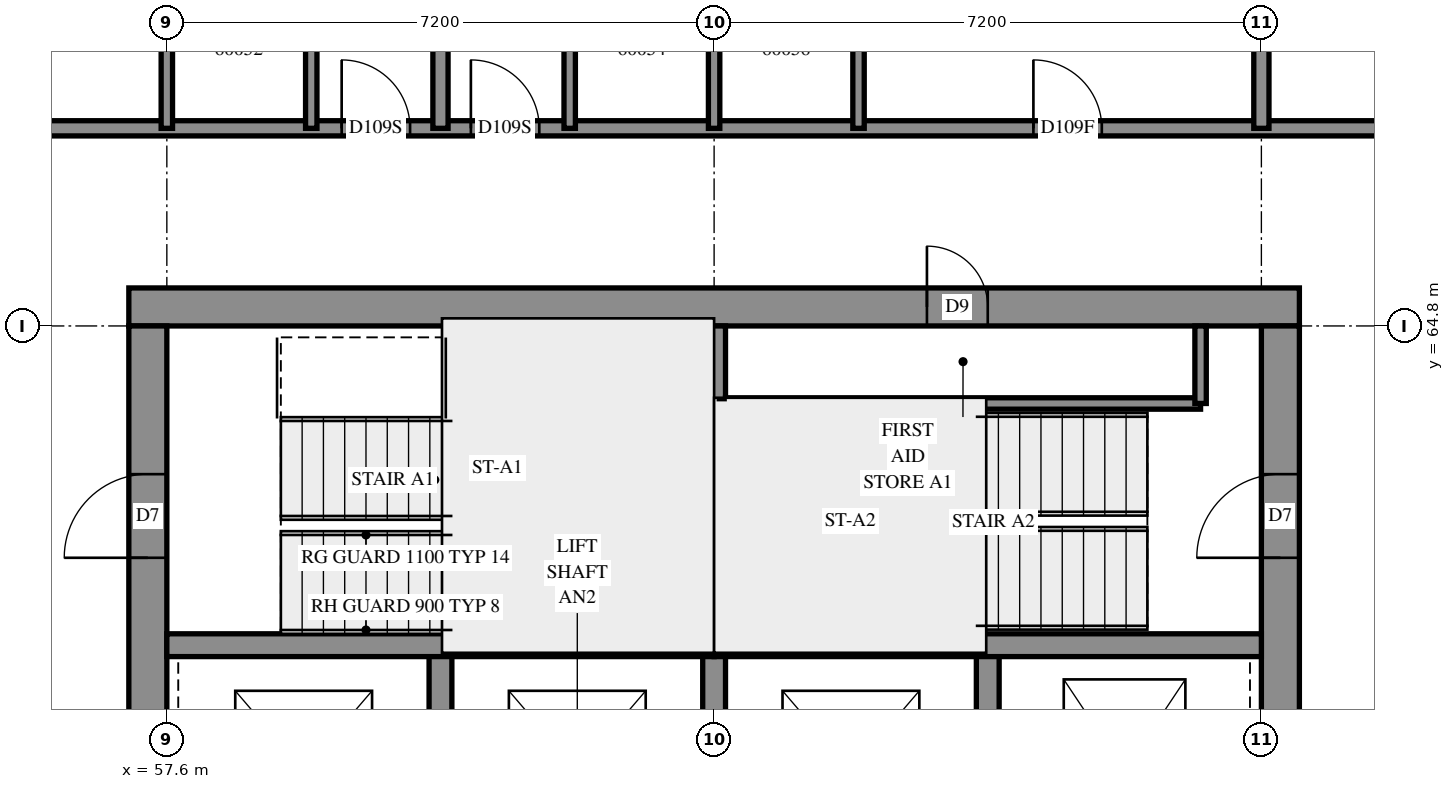
"""IFC4 building model, lengths in metres.
Left out: names, types, materials, properties, quantities, classifications, styles, units other than length and angle.
Written with IfcOpenShell. Run it as: python <this file> out.ifc"""

import sys

from ifc_helpers import new_model, si_unit, direction, frame, frame_2d, origin, place, context, subcontext, project, spatial, rectangle, extrude, element, fill, save


model = new_model("IFC4")
c1 = context("Model", 3, precision=1e-05, world=origin(), true_north=direction((0.0, 1.0)))
c2 = subcontext(c1, "Body", "Model", "MODEL_VIEW")
j1 = project(units=[si_unit("LENGTHUNIT", "METRE"), si_unit("PLANEANGLEUNIT", "RADIAN")], contexts=[c1])
p1 = place(None, origin())
s1 = spatial("IfcSite", under=j1, at=p1, CompositionType="ELEMENT")
p2 = place(p1, origin())
s2 = spatial("IfcBuilding", under=s1, at=p2, CompositionType="ELEMENT")
p3 = place(p2, frame((0.0, 0.0, 220.2)))
s3 = spatial("IfcBuildingStorey", under=s2, at=p3, CompositionType="ELEMENT", Elevation=220.2)
p4 = place(p3, frame((57.1, 65.05, -0.3), z_axis=(0.0, 0.0, 1.0), x_axis=(1.0, 0.0, 0.0)))
e1 = element("IfcWall", 1, at=p4, inside=s3, PredefinedType="SHEAR", context=c2, shape_type="SweptSolid", body=[
    extrude(rectangle(XDim=15.4, YDim=0.5, at=frame_2d((7.7, 0.0))), origin(), (0.0, 0.0, 1.0), 2.7),
])
p5 = place(p4, frame((10.5, 0.0, 0.3)))
e2 = element("IfcOpeningElement", 2, at=p5, cuts=e1, PredefinedType="OPENING", context=c2, shape_type="SweptSolid", body=[
    extrude(rectangle(XDim=0.8, YDim=2.1, at=frame_2d((0.4, 1.05))), frame((0.0, 0.26, 0.0), z_axis=(0.0, -1.0, 0.0), x_axis=(1.0, 0.0, 0.0)), (0.0, 0.0, 1.0), 0.52),
])
p6 = place(p3, frame((57.35, 50.4, -0.3), z_axis=(0.0, 0.0, 1.0), x_axis=(0.0, 1.0, 0.0)))
e3 = element("IfcWall", 3, at=p6, inside=s3, PredefinedType="SHEAR", context=c2, shape_type="SweptSolid", body=[
    extrude(rectangle(XDim=14.4, YDim=0.5, at=frame_2d((7.2, 0.0))), origin(), (0.0, 0.0, 1.0), 2.7),
])
p7 = place(p6, frame((4.55, 0.0, 0.3)))
e4 = element("IfcOpeningElement", 4, at=p7, cuts=e3, PredefinedType="OPENING", context=c2, shape_type="SweptSolid", body=[
    extrude(rectangle(XDim=1.1, YDim=2.1, at=frame_2d((0.55, 1.05))), frame((0.0, 0.26, 0.0), z_axis=(0.0, -1.0, 0.0), x_axis=(1.0, 0.0, 0.0)), (0.0, 0.0, 1.0), 0.52),
])
p8 = place(p6, frame((11.35, 0.0, 0.3)))
e5 = element("IfcOpeningElement", 5, at=p8, cuts=e3, PredefinedType="OPENING", context=c2, shape_type="SweptSolid", body=[
    extrude(rectangle(XDim=1.1, YDim=2.1, at=frame_2d((0.55, 1.05))), frame((0.0, 0.26, 0.0), z_axis=(0.0, -1.0, 0.0), x_axis=(1.0, 0.0, 0.0)), (0.0, 0.0, 1.0), 0.52),
])
p9 = place(p3, frame((72.25, 50.4, -0.3), z_axis=(0.0, 0.0, 1.0), x_axis=(0.0, 1.0, 0.0)))
e6 = element("IfcWall", 6, at=p9, inside=s3, PredefinedType="SHEAR", context=c2, shape_type="SweptSolid", body=[
    extrude(rectangle(XDim=14.4, YDim=0.5, at=frame_2d((7.2, 0.0))), origin(), (0.0, 0.0, 1.0), 2.7),
])
p10 = place(p9, frame((4.55, 0.0, 0.3)))
e7 = element("IfcOpeningElement", 7, at=p10, cuts=e6, PredefinedType="OPENING", context=c2, shape_type="SweptSolid", body=[
    extrude(rectangle(XDim=1.1, YDim=2.1, at=frame_2d((0.55, 1.05))), frame((0.0, 0.26, 0.0), z_axis=(0.0, -1.0, 0.0), x_axis=(1.0, 0.0, 0.0)), (0.0, 0.0, 1.0), 0.52),
])
p11 = place(p9, frame((11.35, 0.0, 0.3)))
e8 = element("IfcOpeningElement", 8, at=p11, cuts=e6, PredefinedType="OPENING", context=c2, shape_type="SweptSolid", body=[
    extrude(rectangle(XDim=1.1, YDim=2.1, at=frame_2d((0.55, 1.05))), frame((0.0, 0.26, 0.0), z_axis=(0.0, -1.0, 0.0), x_axis=(1.0, 0.0, 0.0)), (0.0, 0.0, 1.0), 0.52),
])
for number, where, z_axis, x_axis in (
    (9, (61.2, 57.3, 0.0), (0.0, 0.0, 1.0), (0.0, 1.0, 0.0)),
    (10, (64.8, 57.3, 0.0), (0.0, 0.0, 1.0), (0.0, 1.0, 0.0)),
    (11, (68.4, 57.3, 0.0), (0.0, 0.0, 1.0), (0.0, 1.0, 0.0)),
):
    element("IfcWall", number, at=place(p3, frame(where, z_axis=z_axis, x_axis=x_axis)), inside=s3, PredefinedType="SOLIDWALL", context=c2, shape_type="SweptSolid", body=[
        extrude(rectangle(XDim=3.3, YDim=0.3, at=frame_2d((1.65, 0.0))), origin(), (0.0, 0.0, 1.0), 3.1),
    ])
for number, where, z_axis, x_axis in (
    (12, (57.6, 60.6, 0.0), (0.0, 0.0, 1.0), (1.0, 0.0, 0.0)),
    (13, (64.8, 60.6, 0.0), (0.0, 0.0, 1.0), (1.0, 0.0, 0.0)),
):
    element("IfcWall", number, at=place(p3, frame(where, z_axis=z_axis, x_axis=x_axis)), inside=s3, PredefinedType="SOLIDWALL", context=c2, shape_type="SweptSolid", body=[
        extrude(rectangle(XDim=7.2, YDim=0.3, at=frame_2d((3.6, 0.0))), origin(), (0.0, 0.0, 1.0), 3.1),
    ])
p12 = place(p3, frame((64.8, 60.6, 0.0), z_axis=(0.0, 0.0, 1.0), x_axis=(0.0, 1.0, 0.0)))
e14 = element("IfcWall", 14, at=p12, inside=s3, PredefinedType="SOLIDWALL", context=c2, shape_type="SweptSolid", body=[
    extrude(rectangle(XDim=4.2, YDim=0.3, at=frame_2d((2.1, 0.0))), origin(), (0.0, 0.0, 1.0), 3.1),
])
p13 = place(p3, frame((64.95, 63.78, 0.0), z_axis=(0.0, 0.0, 1.0), x_axis=(1.0, 0.0, 0.0)))
e15 = element("IfcWall", 15, at=p13, inside=s3, PredefinedType="PARTITIONING", context=c2, shape_type="SweptSolid", body=[
    extrude(rectangle(XDim=6.25, YDim=0.15, at=frame_2d((3.125, 0.0))), origin(), (0.0, 0.0, 1.0), 3.1),
])
p14 = place(p3, frame((71.2, 63.78, 0.0), z_axis=(0.0, 0.0, 1.0), x_axis=(0.0, 1.0, 0.0)))
e16 = element("IfcWall", 16, at=p14, inside=s3, PredefinedType="PARTITIONING", context=c2, shape_type="SweptSolid", body=[
    extrude(rectangle(XDim=1.02, YDim=0.15, at=frame_2d((0.51, 0.0))), origin(), (0.0, 0.0, 1.0), 3.1),
])
p15 = place(p3, frame((55.0, 67.4, 0.0), z_axis=(0.0, 0.0, 1.0), x_axis=(1.0, 0.0, 0.0)))
e17 = element("IfcWall", 17, at=p15, inside=s3, PredefinedType="PARTITIONING", context=c2, shape_type="SweptSolid", body=[
    extrude(rectangle(XDim=19.6, YDim=0.2, at=frame_2d((9.8, 0.0))), origin(), (0.0, 0.0, 1.0), 3.1),
])
p16 = place(p15, frame((4.9, 0.0, 0.0)))
e18 = element("IfcOpeningElement", 18, at=p16, cuts=e17, PredefinedType="OPENING", context=c2, shape_type="SweptSolid", body=[
    extrude(rectangle(XDim=0.9, YDim=2.1, at=frame_2d((0.45, 1.05))), frame((0.0, 0.11, 0.0), z_axis=(0.0, -1.0, 0.0), x_axis=(1.0, 0.0, 0.0)), (0.0, 0.0, 1.0), 0.22),
])
p17 = place(p15, frame((6.6, 0.0, 0.0)))
e19 = element("IfcOpeningElement", 19, at=p17, cuts=e17, PredefinedType="OPENING", context=c2, shape_type="SweptSolid", body=[
    extrude(rectangle(XDim=0.9, YDim=2.1, at=frame_2d((0.45, 1.05))), frame((0.0, 0.11, 0.0), z_axis=(0.0, -1.0, 0.0), x_axis=(1.0, 0.0, 0.0)), (0.0, 0.0, 1.0), 0.22),
])
p18 = place(p15, frame((14.001, 0.0, 0.0)))
e20 = element("IfcOpeningElement", 20, at=p18, cuts=e17, PredefinedType="OPENING", context=c2, shape_type="SweptSolid", body=[
    extrude(rectangle(XDim=0.9, YDim=2.1, at=frame_2d((0.45, 1.05))), frame((0.0, 0.11, 0.0), z_axis=(0.0, -1.0, 0.0), x_axis=(1.0, 0.0, 0.0)), (0.0, 0.0, 1.0), 0.22),
])
p19 = place(p3, frame((61.2, 67.4, 0.0), z_axis=(0.0, 0.0, 1.0), x_axis=(0.0, 1.0, 0.0)))
e21 = element("IfcWall", 21, at=p19, inside=s3, PredefinedType="PARTITIONING", context=c2, shape_type="SweptSolid", body=[
    extrude(rectangle(XDim=5.327, YDim=0.2, at=frame_2d((2.663, 0.0))), origin(), (0.0, 0.0, 1.0), 3.1),
])
p20 = place(p3, frame((72.0, 67.4, 0.0), z_axis=(0.0, 0.0, 1.0), x_axis=(0.0, 1.0, 0.0)))
e22 = element("IfcWall", 22, at=p20, inside=s3, PredefinedType="PARTITIONING", context=c2, shape_type="SweptSolid", body=[
    extrude(rectangle(XDim=4.096, YDim=0.2, at=frame_2d((2.048, 0.0))), origin(), (0.0, 0.0, 1.0), 3.1),
])
for number, where, z_axis, x_axis in (
    (23, (59.5, 67.4, 0.0), (0.0, 0.0, 1.0), (0.0, 1.0, 0.0)),
    (24, (57.6, 67.4, 0.0), (0.0, 0.0, 1.0), (0.0, 1.0, 0.0)),
    (25, (62.9, 67.4, 0.0), (0.0, 0.0, 1.0), (0.0, 1.0, 0.0)),
    (26, (64.8, 67.4, 0.0), (0.0, 0.0, 1.0), (0.0, 1.0, 0.0)),
    (27, (66.7, 67.4, 0.0), (0.0, 0.0, 1.0), (0.0, 1.0, 0.0)),
):
    element("IfcWall", number, at=place(p3, frame(where, z_axis=z_axis, x_axis=x_axis)), inside=s3, PredefinedType="PARTITIONING", context=c2, shape_type="SweptSolid", body=[
        extrude(rectangle(XDim=2.4, YDim=0.15, at=frame_2d((1.2, 0.0))), origin(), (0.0, 0.0, 1.0), 3.1),
    ])
p21 = place(p5, origin())
e28 = element("IfcDoor", 28, at=p21, inside=s3, OperationType="SINGLE_SWING_RIGHT", PredefinedType="DOOR", context=c2, shape_type="SweptSolid", body=[
    extrude(rectangle(XDim=0.8, YDim=2.1, at=frame_2d((0.4, 1.05))), frame((0.0, 0.025, 0.0), z_axis=(0.0, -1.0, 0.0), x_axis=(1.0, 0.0, 0.0)), (0.0, 0.0, 1.0), 0.05),
])
fill(e2, e28)
p22 = place(p8, origin())
e29 = element("IfcDoor", 29, at=p22, inside=s3, OperationType="SINGLE_SWING_LEFT", PredefinedType="DOOR", context=c2, shape_type="SweptSolid", body=[
    extrude(rectangle(XDim=1.1, YDim=2.1, at=frame_2d((0.55, 1.05))), frame((0.0, 0.025, 0.0), z_axis=(0.0, -1.0, 0.0), x_axis=(1.0, 0.0, 0.0)), (0.0, 0.0, 1.0), 0.05),
])
fill(e5, e29)
p23 = place(p11, origin())
e30 = element("IfcDoor", 30, at=p23, inside=s3, OperationType="SINGLE_SWING_RIGHT", PredefinedType="DOOR", context=c2, shape_type="SweptSolid", body=[
    extrude(rectangle(XDim=1.1, YDim=2.1, at=frame_2d((0.55, 1.05))), frame((0.0, 0.025, 0.0), z_axis=(0.0, -1.0, 0.0), x_axis=(1.0, 0.0, 0.0)), (0.0, 0.0, 1.0), 0.05),
])
fill(e8, e30)
p24 = place(p16, origin())
e31 = element("IfcDoor", 31, at=p24, inside=s3, OperationType="SINGLE_SWING_RIGHT", PredefinedType="DOOR", context=c2, shape_type="SweptSolid", body=[
    extrude(rectangle(XDim=0.9, YDim=2.1, at=frame_2d((0.45, 1.05))), frame((0.0, 0.025, 0.0), z_axis=(0.0, -1.0, 0.0), x_axis=(1.0, 0.0, 0.0)), (0.0, 0.0, 1.0), 0.05),
])
fill(e18, e31)
p25 = place(p17, origin())
e32 = element("IfcDoor", 32, at=p25, inside=s3, OperationType="SINGLE_SWING_LEFT", PredefinedType="DOOR", context=c2, shape_type="SweptSolid", body=[
    extrude(rectangle(XDim=0.9, YDim=2.1, at=frame_2d((0.45, 1.05))), frame((0.0, 0.025, 0.0), z_axis=(0.0, -1.0, 0.0), x_axis=(1.0, 0.0, 0.0)), (0.0, 0.0, 1.0), 0.05),
])
fill(e19, e32)
p26 = place(p18, origin())
e33 = element("IfcDoor", 33, at=p26, inside=s3, OperationType="SINGLE_SWING_RIGHT", PredefinedType="DOOR", context=c2, shape_type="SweptSolid", body=[
    extrude(rectangle(XDim=0.9, YDim=2.1, at=frame_2d((0.45, 1.05))), frame((0.0, 0.025, 0.0), z_axis=(0.0, -1.0, 0.0), x_axis=(1.0, 0.0, 0.0)), (0.0, 0.0, 1.0), 0.05),
])
fill(e20, e33)
save(model, sys.argv[1])
